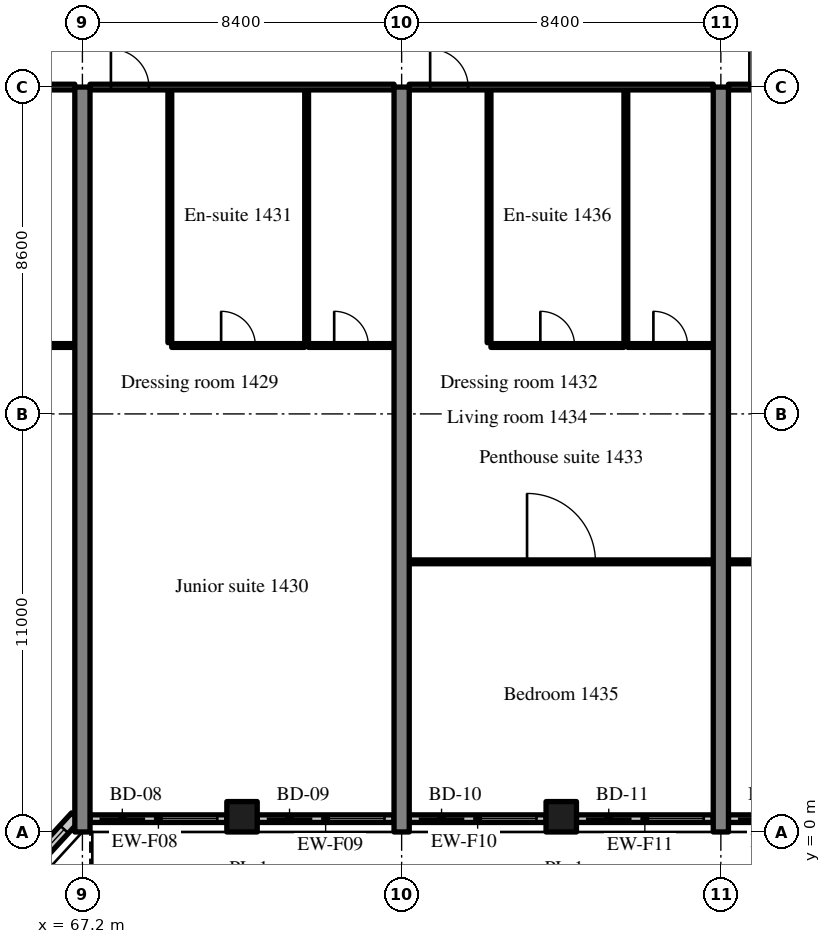
"""IFC4 building model, lengths in metres.
Left out: names, types, materials, properties, quantities, classifications, styles, units other than length and angle.
Written with IfcOpenShell. Run it as: python <this file> out.ifc"""

import sys

from ifc_helpers import new_model, si_unit, direction, frame, frame_2d, origin, origin_2d, place, context, subcontext, project, spatial, rectangle, extrude, source, transform, mapped, element, fill, save


model = new_model("IFC4")
c1 = context("Model", 3, precision=1e-05, world=origin(), true_north=direction((0.0, 1.0)))
c2 = subcontext(c1, "Body", "Model", "MODEL_VIEW")
j1 = project(units=[si_unit("LENGTHUNIT", "METRE"), si_unit("PLANEANGLEUNIT", "RADIAN")], contexts=[c1])
p1 = place(None, origin())
s1 = spatial("IfcSite", under=j1, at=p1, CompositionType="ELEMENT")
p2 = place(p1, origin())
s2 = spatial("IfcBuilding", under=s1, at=p2, CompositionType="ELEMENT")
p3 = place(p2, frame((0.0, 0.0, 62.0)))
s3 = spatial("IfcBuildingStorey", under=s2, at=p3, CompositionType="ELEMENT", Elevation=62.0)
m1 = source(origin(), c2, "Body", "SweptSolid", [
    extrude(rectangle(XDim=19.6, YDim=0.4, at=frame_2d((9.8, 0.0))), origin(), (0.0, 0.0, 1.0), 3.52),
])
for number, where, z_axis, x_axis in (
    (1, (67.2, 0.0, 0.0), (0.0, 0.0, 1.0), (0.0, 1.0, 0.0)),
    (2, (75.6, 0.0, 0.0), (0.0, 0.0, 1.0), (0.0, 1.0, 0.0)),
    (3, (84.0, 0.0, 0.0), (0.0, 0.0, 1.0), (0.0, 1.0, 0.0)),
):
    element("IfcWall", number, at=place(p3, frame(where, z_axis=z_axis, x_axis=x_axis)), inside=s3, PredefinedType="SHEAR", context=c2, shape_type="MappedRepresentation", body=[
        mapped(m1, transform((0.0, 0.0, 0.0), scale=1.0)),
    ])
m2 = source(origin(), c2, "Body", "SweptSolid", [
    extrude(rectangle(XDim=0.8, YDim=0.8, at=origin_2d()), origin(), (0.0, 0.0, 1.0), 3.52),
])
for number, where, z_axis, x_axis in (
    (4, (71.4, 0.4, 0.0), (0.0, 0.0, 1.0), (1.0, 0.0, 0.0)),
    (5, (79.8, 0.4, 0.0), (0.0, 0.0, 1.0), (1.0, 0.0, 0.0)),
):
    element("IfcColumn", number, at=place(p3, frame(where, z_axis=z_axis, x_axis=x_axis)), inside=s3, PredefinedType="COLUMN", context=c2, shape_type="MappedRepresentation", body=[
        mapped(m2, transform((0.0, 0.0, 0.0), scale=1.0)),
    ])
m3 = source(origin(), c2, "Body", "SweptSolid", [
    extrude(rectangle(XDim=2.398, YDim=0.3, at=frame_2d((1.199, 0.0))), origin(), (0.0, 0.0, 1.0), 3.52),
])
p4 = place(p3, frame((65.404, -1.369, 0.0), z_axis=(0.0, 0.0, 1.0), x_axis=(0.675374189419, 0.737475222815, 0.0)))
e6 = element("IfcWall", 6, at=p4, inside=s3, PredefinedType="SOLIDWALL", context=c2, shape_type="MappedRepresentation", body=[
    mapped(m3, transform((0.0, 0.0, 0.0), scale=1.0)),
])
m4 = source(origin(), c2, "Body", "SweptSolid", [
    extrude(rectangle(XDim=1.5, YDim=2.0, at=frame_2d((0.75, 1.0))), frame((0.0, 0.16, 0.0), z_axis=(0.0, -1.0, 0.0), x_axis=(1.0, 0.0, 0.0)), (0.0, 0.0, 1.0), 0.32),
])
p5 = place(p4, frame((0.449, 0.0, 0.9)))
e7 = element("IfcOpeningElement", 7, at=p5, cuts=e6, PredefinedType="OPENING", context=c2, shape_type="MappedRepresentation", body=[
    mapped(m4, transform((0.0, 0.0, 0.0), scale=1.0)),
])
m5 = source(origin(), c2, "Body", "SweptSolid", [
    extrude(rectangle(XDim=3.6, YDim=0.2, at=frame_2d((1.8, 0.0))), origin(), (0.0, 0.0, 1.0), 2.82),
])
p6 = place(p3, frame((67.4, 0.35, 0.0), z_axis=(0.0, 0.0, 1.0), x_axis=(1.0, 0.0, 0.0)))
e8 = element("IfcWall", 8, at=p6, inside=s3, PredefinedType="SOLIDWALL", context=c2, shape_type="MappedRepresentation", body=[
    mapped(m5, transform((0.0, 0.0, 0.0), scale=1.0)),
])
m6 = source(origin(), c2, "Body", "SweptSolid", [
    extrude(rectangle(XDim=1.2, YDim=2.4, at=frame_2d((0.6, 1.2))), frame((0.0, 0.11, 0.0), z_axis=(0.0, -1.0, 0.0), x_axis=(1.0, 0.0, 0.0)), (0.0, 0.0, 1.0), 0.22),
])
p7 = place(p6, frame((0.25, 0.0, 0.0)))
e9 = element("IfcOpeningElement", 9, at=p7, cuts=e8, PredefinedType="OPENING", context=c2, shape_type="MappedRepresentation", body=[
    mapped(m6, transform((0.0, 0.0, 0.0), scale=1.0)),
])
m7 = source(origin(), c2, "Body", "SweptSolid", [
    extrude(rectangle(XDim=1.5, YDim=1.5, at=frame_2d((0.75, 0.75))), frame((0.0, 0.11, 0.0), z_axis=(0.0, -1.0, 0.0), x_axis=(1.0, 0.0, 0.0)), (0.0, 0.0, 1.0), 0.22),
])
p8 = place(p6, frame((1.85, 0.0, 0.9)))
e10 = element("IfcOpeningElement", 10, at=p8, cuts=e8, PredefinedType="OPENING", context=c2, shape_type="MappedRepresentation", body=[
    mapped(m7, transform((0.0, 0.0, 0.0), scale=1.0)),
])
m8 = source(origin(), c2, "Body", "SweptSolid", [
    extrude(rectangle(XDim=3.6, YDim=0.2, at=frame_2d((1.8, 0.0))), origin(), (0.0, 0.0, 1.0), 2.82),
])
p9 = place(p3, frame((71.8, 0.35, 0.0), z_axis=(0.0, 0.0, 1.0), x_axis=(1.0, 0.0, 0.0)))
e11 = element("IfcWall", 11, at=p9, inside=s3, PredefinedType="SOLIDWALL", context=c2, shape_type="MappedRepresentation", body=[
    mapped(m8, transform((0.0, 0.0, 0.0), scale=1.0)),
])
p10 = place(p9, frame((0.25, 0.0, 0.0)))
e12 = element("IfcOpeningElement", 12, at=p10, cuts=e11, PredefinedType="OPENING", context=c2, shape_type="MappedRepresentation", body=[
    mapped(m6, transform((0.0, 0.0, 0.0), scale=1.0)),
])
p11 = place(p9, frame((1.85, 0.0, 0.9)))
e13 = element("IfcOpeningElement", 13, at=p11, cuts=e11, PredefinedType="OPENING", context=c2, shape_type="MappedRepresentation", body=[
    mapped(m7, transform((0.0, 0.0, 0.0), scale=1.0)),
])
p12 = place(p3, frame((75.8, 0.35, 0.0), z_axis=(0.0, 0.0, 1.0), x_axis=(1.0, 0.0, 0.0)))
e14 = element("IfcWall", 14, at=p12, inside=s3, PredefinedType="SOLIDWALL", context=c2, shape_type="MappedRepresentation", body=[
    mapped(m8, transform((0.0, 0.0, 0.0), scale=1.0)),
])
p13 = place(p12, frame((0.25, 0.0, 0.0)))
e15 = element("IfcOpeningElement", 15, at=p13, cuts=e14, PredefinedType="OPENING", context=c2, shape_type="MappedRepresentation", body=[
    mapped(m6, transform((0.0, 0.0, 0.0), scale=1.0)),
])
p14 = place(p12, frame((1.85, 0.0, 0.9)))
e16 = element("IfcOpeningElement", 16, at=p14, cuts=e14, PredefinedType="OPENING", context=c2, shape_type="MappedRepresentation", body=[
    mapped(m7, transform((0.0, 0.0, 0.0), scale=1.0)),
])
p15 = place(p3, frame((80.2, 0.35, 0.0), z_axis=(0.0, 0.0, 1.0), x_axis=(1.0, 0.0, 0.0)))
e17 = element("IfcWall", 17, at=p15, inside=s3, PredefinedType="SOLIDWALL", context=c2, shape_type="MappedRepresentation", body=[
    mapped(m5, transform((0.0, 0.0, 0.0), scale=1.0)),
])
p16 = place(p15, frame((0.25, 0.0, 0.0)))
e18 = element("IfcOpeningElement", 18, at=p16, cuts=e17, PredefinedType="OPENING", context=c2, shape_type="MappedRepresentation", body=[
    mapped(m6, transform((0.0, 0.0, 0.0), scale=1.0)),
])
p17 = place(p15, frame((1.85, 0.0, 0.9)))
e19 = element("IfcOpeningElement", 19, at=p17, cuts=e17, PredefinedType="OPENING", context=c2, shape_type="MappedRepresentation", body=[
    mapped(m7, transform((0.0, 0.0, 0.0), scale=1.0)),
])
p18 = place(p3, frame((84.2, 0.35, 0.0), z_axis=(0.0, 0.0, 1.0), x_axis=(1.0, 0.0, 0.0)))
e20 = element("IfcWall", 20, at=p18, inside=s3, PredefinedType="SOLIDWALL", context=c2, shape_type="MappedRepresentation", body=[
    mapped(m5, transform((0.0, 0.0, 0.0), scale=1.0)),
])
p19 = place(p18, frame((0.25, 0.0, 0.0)))
e21 = element("IfcOpeningElement", 21, at=p19, cuts=e20, PredefinedType="OPENING", context=c2, shape_type="MappedRepresentation", body=[
    mapped(m6, transform((0.0, 0.0, 0.0), scale=1.0)),
])
p20 = place(p18, frame((1.85, 0.0, 0.9)))
e22 = element("IfcOpeningElement", 22, at=p20, cuts=e20, PredefinedType="OPENING", context=c2, shape_type="MappedRepresentation", body=[
    mapped(m7, transform((0.0, 0.0, 0.0), scale=1.0)),
])
m9 = source(origin(), c2, "Body", "SweptSolid", [
    extrude(rectangle(XDim=2.25, YDim=0.1, at=frame_2d((1.125, 0.0))), origin(), (0.0, 0.0, 1.0), 3.52),
])
p21 = place(p3, frame((64.75, 12.8, 0.0), z_axis=(0.0, 0.0, 1.0), x_axis=(1.0, 0.0, 0.0)))
e23 = element("IfcWall", 23, at=p21, inside=s3, PredefinedType="PARTITIONING", context=c2, shape_type="MappedRepresentation", body=[
    mapped(m9, transform((0.0, 0.0, 0.0), scale=1.0)),
])
m10 = source(origin(), c2, "Body", "SweptSolid", [
    extrude(rectangle(XDim=0.9, YDim=2.1, at=frame_2d((0.45, 1.05))), frame((0.0, 0.06, 0.0), z_axis=(0.0, -1.0, 0.0), x_axis=(1.0, 0.0, 0.0)), (0.0, 0.0, 1.0), 0.12),
])
p22 = place(p21, frame((0.675, 0.0, 0.0)))
e24 = element("IfcOpeningElement", 24, at=p22, cuts=e23, PredefinedType="OPENING", context=c2, shape_type="MappedRepresentation", body=[
    mapped(m10, transform((0.0, 0.0, 0.0), scale=1.0)),
])
m11 = source(origin(), c2, "Body", "SweptSolid", [
    extrude(rectangle(XDim=8.0, YDim=0.15, at=frame_2d((4.0, 0.0))), origin(), (0.0, 0.0, 1.0), 2.82),
])
p23 = place(p3, frame((59.0, 19.6, 0.0), z_axis=(0.0, 0.0, 1.0), x_axis=(1.0, 0.0, 0.0)))
e25 = element("IfcWall", 25, at=p23, inside=s3, PredefinedType="PARTITIONING", context=c2, shape_type="MappedRepresentation", body=[
    mapped(m11, transform((0.0, 0.0, 0.0), scale=1.0)),
])
m12 = source(origin(), c2, "Body", "SweptSolid", [
    extrude(rectangle(XDim=1.0, YDim=2.1, at=frame_2d((0.5, 1.05))), frame((0.0, 0.085, 0.0), z_axis=(0.0, -1.0, 0.0), x_axis=(1.0, 0.0, 0.0)), (0.0, 0.0, 1.0), 0.17),
])
p24 = place(p23, frame((0.55, 0.0, 0.0)))
e26 = element("IfcOpeningElement", 26, at=p24, cuts=e25, PredefinedType="OPENING", context=c2, shape_type="MappedRepresentation", body=[
    mapped(m12, transform((0.0, 0.0, 0.0), scale=1.0)),
])
m13 = source(origin(), c2, "Body", "SweptSolid", [
    extrude(rectangle(XDim=6.65, YDim=0.1, at=frame_2d((3.325, 0.0))), origin(), (0.0, 0.0, 1.0), 3.52),
])
for number, where, z_axis, x_axis in (
    (27, (69.5, 12.875, 0.0), (0.0, 0.0, 1.0), (0.0, 1.0, 0.0)),
    (28, (73.1, 12.875, 0.0), (0.0, 0.0, 1.0), (0.0, 1.0, 0.0)),
):
    element("IfcWall", number, at=place(p3, frame(where, z_axis=z_axis, x_axis=x_axis)), inside=s3, PredefinedType="PARTITIONING", context=c2, shape_type="MappedRepresentation", body=[
        mapped(m13, transform((0.0, 0.0, 0.0), scale=1.0)),
    ])
m14 = source(origin(), c2, "Body", "SweptSolid", [
    extrude(rectangle(XDim=3.5, YDim=0.1, at=frame_2d((1.75, 0.0))), origin(), (0.0, 0.0, 1.0), 3.52),
])
p25 = place(p3, frame((69.55, 12.8, 0.0), z_axis=(0.0, 0.0, 1.0), x_axis=(1.0, 0.0, 0.0)))
e29 = element("IfcWall", 29, at=p25, inside=s3, PredefinedType="PARTITIONING", context=c2, shape_type="MappedRepresentation", body=[
    mapped(m14, transform((0.0, 0.0, 0.0), scale=1.0)),
])
p26 = place(p25, frame((1.3, 0.0, 0.0)))
e30 = element("IfcOpeningElement", 30, at=p26, cuts=e29, PredefinedType="OPENING", context=c2, shape_type="MappedRepresentation", body=[
    mapped(m10, transform((0.0, 0.0, 0.0), scale=1.0)),
])
p27 = place(p3, frame((73.15, 12.8, 0.0), z_axis=(0.0, 0.0, 1.0), x_axis=(1.0, 0.0, 0.0)))
e31 = element("IfcWall", 31, at=p27, inside=s3, PredefinedType="PARTITIONING", context=c2, shape_type="MappedRepresentation", body=[
    mapped(m9, transform((0.0, 0.0, 0.0), scale=1.0)),
])
p28 = place(p27, frame((0.675, 0.0, 0.0)))
e32 = element("IfcOpeningElement", 32, at=p28, cuts=e31, PredefinedType="OPENING", context=c2, shape_type="MappedRepresentation", body=[
    mapped(m10, transform((0.0, 0.0, 0.0), scale=1.0)),
])
p29 = place(p3, frame((67.4, 19.6, 0.0), z_axis=(0.0, 0.0, 1.0), x_axis=(1.0, 0.0, 0.0)))
e33 = element("IfcWall", 33, at=p29, inside=s3, PredefinedType="PARTITIONING", context=c2, shape_type="MappedRepresentation", body=[
    mapped(m11, transform((0.0, 0.0, 0.0), scale=1.0)),
])
p30 = place(p29, frame((0.55, 0.0, 0.0)))
e34 = element("IfcOpeningElement", 34, at=p30, cuts=e33, PredefinedType="OPENING", context=c2, shape_type="MappedRepresentation", body=[
    mapped(m12, transform((0.0, 0.0, 0.0), scale=1.0)),
])
for number, where, z_axis, x_axis in (
    (35, (77.9, 12.875, 0.0), (0.0, 0.0, 1.0), (0.0, 1.0, 0.0)),
    (36, (81.5, 12.875, 0.0), (0.0, 0.0, 1.0), (0.0, 1.0, 0.0)),
):
    element("IfcWall", number, at=place(p3, frame(where, z_axis=z_axis, x_axis=x_axis)), inside=s3, PredefinedType="PARTITIONING", context=c2, shape_type="MappedRepresentation", body=[
        mapped(m13, transform((0.0, 0.0, 0.0), scale=1.0)),
    ])
p31 = place(p3, frame((77.95, 12.8, 0.0), z_axis=(0.0, 0.0, 1.0), x_axis=(1.0, 0.0, 0.0)))
e37 = element("IfcWall", 37, at=p31, inside=s3, PredefinedType="PARTITIONING", context=c2, shape_type="MappedRepresentation", body=[
    mapped(m14, transform((0.0, 0.0, 0.0), scale=1.0)),
])
p32 = place(p31, frame((1.3, 0.0, 0.0)))
e38 = element("IfcOpeningElement", 38, at=p32, cuts=e37, PredefinedType="OPENING", context=c2, shape_type="MappedRepresentation", body=[
    mapped(m10, transform((0.0, 0.0, 0.0), scale=1.0)),
])
p33 = place(p3, frame((81.55, 12.8, 0.0), z_axis=(0.0, 0.0, 1.0), x_axis=(1.0, 0.0, 0.0)))
e39 = element("IfcWall", 39, at=p33, inside=s3, PredefinedType="PARTITIONING", context=c2, shape_type="MappedRepresentation", body=[
    mapped(m9, transform((0.0, 0.0, 0.0), scale=1.0)),
])
p34 = place(p33, frame((0.675, 0.0, 0.0)))
e40 = element("IfcOpeningElement", 40, at=p34, cuts=e39, PredefinedType="OPENING", context=c2, shape_type="MappedRepresentation", body=[
    mapped(m10, transform((0.0, 0.0, 0.0), scale=1.0)),
])
m15 = source(origin(), c2, "Body", "SweptSolid", [
    extrude(rectangle(XDim=8.0, YDim=0.1, at=frame_2d((4.0, 0.0))), origin(), (0.0, 0.0, 1.0), 3.52),
])
p35 = place(p3, frame((75.8, 7.108, 0.0), z_axis=(0.0, 0.0, 1.0), x_axis=(1.0, 0.0, 0.0)))
e41 = element("IfcWall", 41, at=p35, inside=s3, PredefinedType="PARTITIONING", context=c2, shape_type="MappedRepresentation", body=[
    mapped(m15, transform((0.0, 0.0, 0.0), scale=1.0)),
])
m16 = source(origin(), c2, "Body", "SweptSolid", [
    extrude(rectangle(XDim=1.8, YDim=2.1, at=frame_2d((0.9, 1.05))), frame((0.0, 0.06, 0.0), z_axis=(0.0, -1.0, 0.0), x_axis=(1.0, 0.0, 0.0)), (0.0, 0.0, 1.0), 0.12),
])
p36 = place(p35, frame((3.1, 0.0, 0.0)))
e42 = element("IfcOpeningElement", 42, at=p36, cuts=e41, PredefinedType="OPENING", context=c2, shape_type="MappedRepresentation", body=[
    mapped(m16, transform((0.0, 0.0, 0.0), scale=1.0)),
])
p37 = place(p3, frame((75.8, 19.6, 0.0), z_axis=(0.0, 0.0, 1.0), x_axis=(1.0, 0.0, 0.0)))
e43 = element("IfcWall", 43, at=p37, inside=s3, PredefinedType="PARTITIONING", context=c2, shape_type="MappedRepresentation", body=[
    mapped(m11, transform((0.0, 0.0, 0.0), scale=1.0)),
])
p38 = place(p37, frame((0.55, 0.0, 0.0)))
e44 = element("IfcOpeningElement", 44, at=p38, cuts=e43, PredefinedType="OPENING", context=c2, shape_type="MappedRepresentation", body=[
    mapped(m12, transform((0.0, 0.0, 0.0), scale=1.0)),
])
p39 = place(p3, frame((84.2, 7.108, 0.0), z_axis=(0.0, 0.0, 1.0), x_axis=(1.0, 0.0, 0.0)))
e45 = element("IfcWall", 45, at=p39, inside=s3, PredefinedType="PARTITIONING", context=c2, shape_type="MappedRepresentation", body=[
    mapped(m15, transform((0.0, 0.0, 0.0), scale=1.0)),
])
p40 = place(p39, frame((3.1, 0.0, 0.0)))
e46 = element("IfcOpeningElement", 46, at=p40, cuts=e45, PredefinedType="OPENING", context=c2, shape_type="MappedRepresentation", body=[
    mapped(m16, transform((0.0, 0.0, 0.0), scale=1.0)),
])
p41 = place(p3, frame((84.2, 19.6, 0.0), z_axis=(0.0, 0.0, 1.0), x_axis=(1.0, 0.0, 0.0)))
e47 = element("IfcWall", 47, at=p41, inside=s3, PredefinedType="PARTITIONING", context=c2, shape_type="MappedRepresentation", body=[
    mapped(m11, transform((0.0, 0.0, 0.0), scale=1.0)),
])
p42 = place(p41, frame((0.55, 0.0, 0.0)))
e48 = element("IfcOpeningElement", 48, at=p42, cuts=e47, PredefinedType="OPENING", context=c2, shape_type="MappedRepresentation", body=[
    mapped(m12, transform((0.0, 0.0, 0.0), scale=1.0)),
])
m17 = source(origin(), c2, "Body", "SweptSolid", [
    extrude(rectangle(XDim=1.5, YDim=2.0, at=frame_2d((0.75, 1.0))), frame((0.0, 0.03, 0.0), z_axis=(0.0, -1.0, 0.0), x_axis=(1.0, 0.0, 0.0)), (0.0, 0.0, 1.0), 0.06),
])
p43 = place(p5, origin())
e49 = element("IfcWindow", 49, at=p43, inside=s3, PartitioningType="SINGLE_PANEL", PredefinedType="WINDOW", context=c2, shape_type="MappedRepresentation", body=[
    mapped(m17, transform((0.0, 0.0, 0.0), scale=1.0)),
])
fill(e7, e49)
m18 = source(origin(), c2, "Body", "SweptSolid", [
    extrude(rectangle(XDim=1.2, YDim=2.4, at=frame_2d((0.6, 1.2))), frame((0.0, 0.025, 0.0), z_axis=(0.0, -1.0, 0.0), x_axis=(1.0, 0.0, 0.0)), (0.0, 0.0, 1.0), 0.05),
])
p44 = place(p7, origin())
e50 = element("IfcDoor", 50, at=p44, inside=s3, OperationType="SLIDING_TO_RIGHT", PredefinedType="DOOR", context=c2, shape_type="MappedRepresentation", body=[
    mapped(m18, transform((0.0, 0.0, 0.0), scale=1.0)),
])
fill(e9, e50)
m19 = source(origin(), c2, "Body", "SweptSolid", [
    extrude(rectangle(XDim=1.5, YDim=1.5, at=frame_2d((0.75, 0.75))), frame((0.0, 0.03, 0.0), z_axis=(0.0, -1.0, 0.0), x_axis=(1.0, 0.0, 0.0)), (0.0, 0.0, 1.0), 0.06),
])
p45 = place(p8, origin())
e51 = element("IfcWindow", 51, at=p45, inside=s3, PartitioningType="SINGLE_PANEL", PredefinedType="WINDOW", context=c2, shape_type="MappedRepresentation", body=[
    mapped(m19, transform((0.0, 0.0, 0.0), scale=1.0)),
])
fill(e10, e51)
p46 = place(p10, origin())
e52 = element("IfcDoor", 52, at=p46, inside=s3, OperationType="SLIDING_TO_LEFT", PredefinedType="DOOR", context=c2, shape_type="MappedRepresentation", body=[
    mapped(m18, transform((0.0, 0.0, 0.0), scale=1.0)),
])
fill(e12, e52)
p47 = place(p11, origin())
e53 = element("IfcWindow", 53, at=p47, inside=s3, PartitioningType="SINGLE_PANEL", PredefinedType="WINDOW", context=c2, shape_type="MappedRepresentation", body=[
    mapped(m19, transform((0.0, 0.0, 0.0), scale=1.0)),
])
fill(e13, e53)
p48 = place(p13, origin())
e54 = element("IfcDoor", 54, at=p48, inside=s3, OperationType="SLIDING_TO_RIGHT", PredefinedType="DOOR", context=c2, shape_type="MappedRepresentation", body=[
    mapped(m18, transform((0.0, 0.0, 0.0), scale=1.0)),
])
fill(e15, e54)
p49 = place(p14, origin())
e55 = element("IfcWindow", 55, at=p49, inside=s3, PartitioningType="SINGLE_PANEL", PredefinedType="WINDOW", context=c2, shape_type="MappedRepresentation", body=[
    mapped(m19, transform((0.0, 0.0, 0.0), scale=1.0)),
])
fill(e16, e55)
p50 = place(p16, origin())
e56 = element("IfcDoor", 56, at=p50, inside=s3, OperationType="SLIDING_TO_LEFT", PredefinedType="DOOR", context=c2, shape_type="MappedRepresentation", body=[
    mapped(m18, transform((0.0, 0.0, 0.0), scale=1.0)),
])
fill(e18, e56)
p51 = place(p17, origin())
e57 = element("IfcWindow", 57, at=p51, inside=s3, PartitioningType="SINGLE_PANEL", PredefinedType="WINDOW", context=c2, shape_type="MappedRepresentation", body=[
    mapped(m19, transform((0.0, 0.0, 0.0), scale=1.0)),
])
fill(e19, e57)
p52 = place(p19, origin())
e58 = element("IfcDoor", 58, at=p52, inside=s3, OperationType="SLIDING_TO_RIGHT", PredefinedType="DOOR", context=c2, shape_type="MappedRepresentation", body=[
    mapped(m18, transform((0.0, 0.0, 0.0), scale=1.0)),
])
fill(e21, e58)
m20 = source(origin(), c2, "Body", "SweptSolid", [
    extrude(rectangle(XDim=0.9, YDim=2.1, at=frame_2d((0.45, 1.05))), frame((0.0, 0.025, 0.0), z_axis=(0.0, -1.0, 0.0), x_axis=(1.0, 0.0, 0.0)), (0.0, 0.0, 1.0), 0.05),
])
p53 = place(p26, origin())
e59 = element("IfcDoor", 59, at=p53, inside=s3, OperationType="SINGLE_SWING_LEFT", PredefinedType="DOOR", context=c2, shape_type="MappedRepresentation", body=[
    mapped(m20, transform((0.0, 0.0, 0.0), scale=1.0)),
])
fill(e30, e59)
p54 = place(p28, origin())
e60 = element("IfcDoor", 60, at=p54, inside=s3, OperationType="SINGLE_SWING_LEFT", PredefinedType="DOOR", context=c2, shape_type="MappedRepresentation", body=[
    mapped(m20, transform((0.0, 0.0, 0.0), scale=1.0)),
])
fill(e32, e60)
m21 = source(origin(), c2, "Body", "SweptSolid", [
    extrude(rectangle(XDim=1.0, YDim=2.1, at=frame_2d((0.5, 1.05))), frame((0.0, 0.025, 0.0), z_axis=(0.0, -1.0, 0.0), x_axis=(1.0, 0.0, 0.0)), (0.0, 0.0, 1.0), 0.05),
])
p55 = place(p30, origin())
e61 = element("IfcDoor", 61, at=p55, inside=s3, OperationType="SINGLE_SWING_LEFT", PredefinedType="DOOR", context=c2, shape_type="MappedRepresentation", body=[
    mapped(m21, transform((0.0, 0.0, 0.0), scale=1.0)),
])
fill(e34, e61)
p56 = place(p32, origin())
e62 = element("IfcDoor", 62, at=p56, inside=s3, OperationType="SINGLE_SWING_LEFT", PredefinedType="DOOR", context=c2, shape_type="MappedRepresentation", body=[
    mapped(m20, transform((0.0, 0.0, 0.0), scale=1.0)),
])
fill(e38, e62)
p57 = place(p34, origin())
e63 = element("IfcDoor", 63, at=p57, inside=s3, OperationType="SINGLE_SWING_LEFT", PredefinedType="DOOR", context=c2, shape_type="MappedRepresentation", body=[
    mapped(m20, transform((0.0, 0.0, 0.0), scale=1.0)),
])
fill(e40, e63)
m22 = source(origin(), c2, "Body", "SweptSolid", [
    extrude(rectangle(XDim=1.8, YDim=2.1, at=frame_2d((0.9, 1.05))), frame((0.0, 0.025, 0.0), z_axis=(0.0, -1.0, 0.0), x_axis=(1.0, 0.0, 0.0)), (0.0, 0.0, 1.0), 0.05),
])
p58 = place(p36, origin())
e64 = element("IfcDoor", 64, at=p58, inside=s3, OperationType="DOUBLE_DOOR_SINGLE_SWING", PredefinedType="DOOR", context=c2, shape_type="MappedRepresentation", body=[
    mapped(m22, transform((0.0, 0.0, 0.0), scale=1.0)),
])
fill(e42, e64)
p59 = place(p38, origin())
e65 = element("IfcDoor", 65, at=p59, inside=s3, OperationType="SINGLE_SWING_LEFT", PredefinedType="DOOR", context=c2, shape_type="MappedRepresentation", body=[
    mapped(m21, transform((0.0, 0.0, 0.0), scale=1.0)),
])
fill(e44, e65)
p60 = place(p42, origin())
e66 = element("IfcDoor", 66, at=p60, inside=s3, OperationType="SINGLE_SWING_LEFT", PredefinedType="DOOR", context=c2, shape_type="MappedRepresentation", body=[
    mapped(m21, transform((0.0, 0.0, 0.0), scale=1.0)),
])
fill(e48, e66)
save(model, sys.argv[1])
